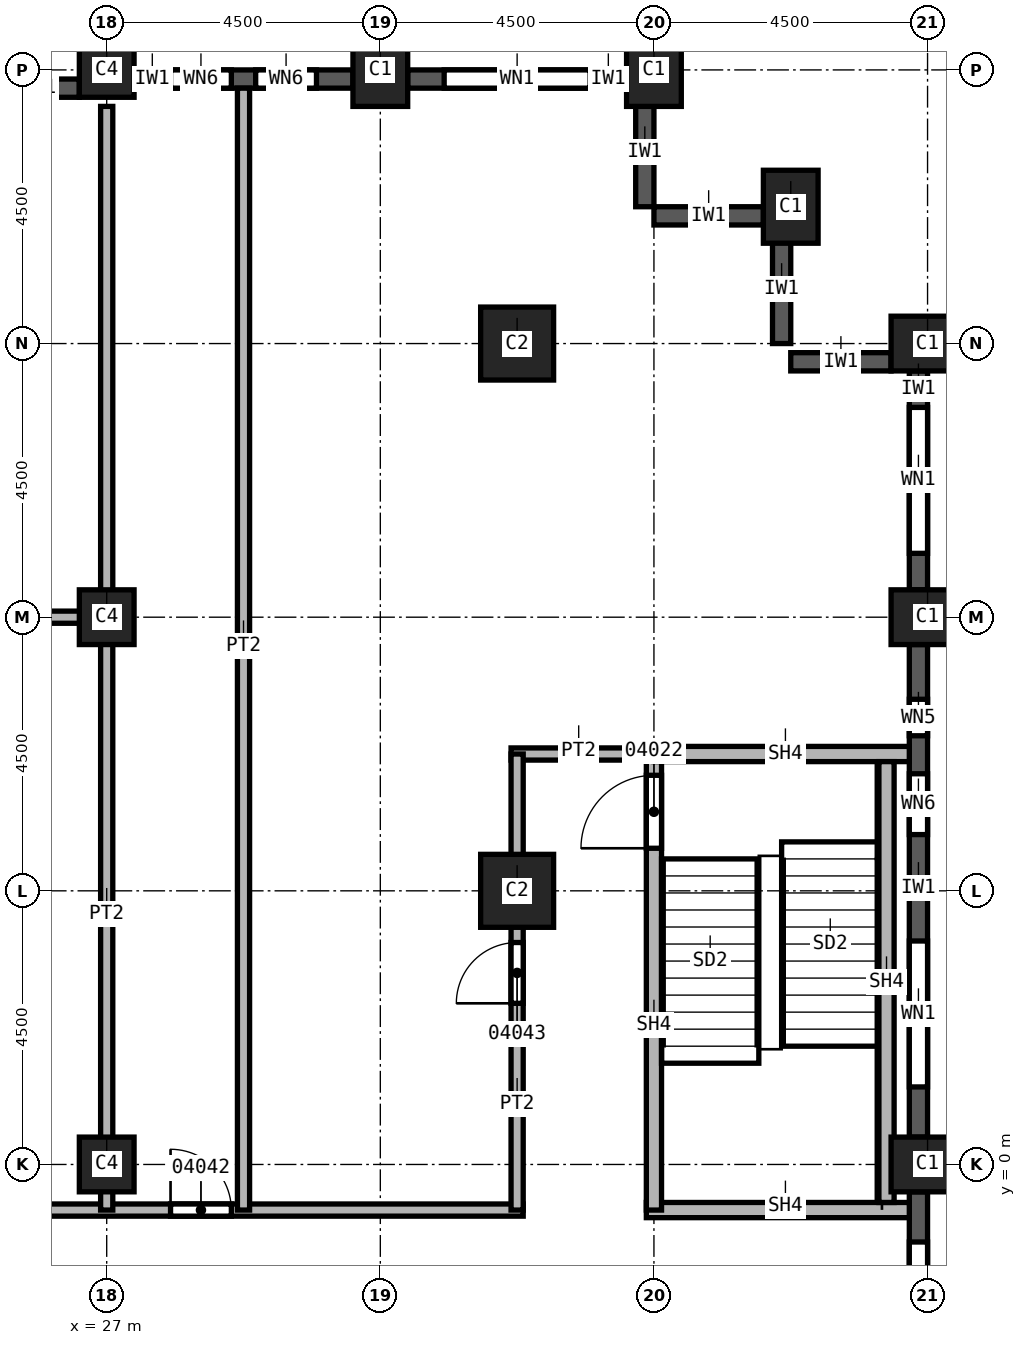
"""IFC4 building model, lengths in metres.
Left out: names, types, materials, properties, quantities, classifications, styles, units other than length and angle.
Written with IfcOpenShell. Run it as: python <this file> out.ifc"""

import sys

from ifc_helpers import new_model, si_unit, direction, frame, frame_2d, origin, origin_2d, place, context, subcontext, project, spatial, rectangle, extrude, element, fill, save


model = new_model("IFC4")
c1 = context("Model", 3, precision=1e-05, world=origin(), true_north=direction((0.0, 1.0)))
c2 = subcontext(c1, "Body", "Model", "MODEL_VIEW")
j1 = project(units=[si_unit("LENGTHUNIT", "METRE"), si_unit("PLANEANGLEUNIT", "RADIAN")], contexts=[c1])
p1 = place(None, origin())
s1 = spatial("IfcSite", under=j1, at=p1, CompositionType="ELEMENT")
p2 = place(p1, origin())
s2 = spatial("IfcBuilding", under=s1, at=p2, CompositionType="ELEMENT")
p3 = place(p2, frame((0.0, 0.0, 108.0)))
s3 = spatial("IfcBuildingStorey", under=s2, at=p3, CompositionType="ELEMENT", Elevation=108.0)
for number, where, z_axis, x_axis in (
    (1, (40.5, 0.0, 0.0), (0.0, 0.0, 1.0), (0.0, 1.0, 0.0)),
    (2, (40.5, 9.0, 0.0), (0.0, 0.0, 1.0), (0.0, 1.0, 0.0)),
    (3, (40.5, 13.5, 0.0), (0.0, 0.0, 1.0), (0.0, 1.0, 0.0)),
    (4, (38.25, 15.75, 0.0), (0.0, 0.0, 1.0), (1.0, 0.0, 0.0)),
    (5, (31.5, 18.0, 0.0), (0.0, 0.0, 1.0), (1.0, 0.0, 0.0)),
    (6, (36.0, 18.0, 0.0), (0.0, 0.0, 1.0), (1.0, 0.0, 0.0)),
):
    element("IfcColumn", number, at=place(p3, frame(where, z_axis=z_axis, x_axis=x_axis)), inside=s3, PredefinedType="COLUMN", context=c2, shape_type="SweptSolid", body=[
        extrude(rectangle(XDim=0.9, YDim=1.2, at=origin_2d()), origin(), (0.0, 0.0, 1.0), 3.7),
    ])
for number, where, z_axis, x_axis in (
    (7, (33.75, 4.5, 0.0), (0.0, 0.0, 1.0), (1.0, 0.0, 0.0)),
    (8, (33.75, 13.5, 0.0), (0.0, 0.0, 1.0), (1.0, 0.0, 0.0)),
):
    element("IfcColumn", number, at=place(p3, frame(where, z_axis=z_axis, x_axis=x_axis)), inside=s3, PredefinedType="COLUMN", context=c2, shape_type="SweptSolid", body=[
        extrude(rectangle(XDim=1.2, YDim=1.2, at=origin_2d()), origin(), (0.0, 0.0, 1.0), 3.7),
    ])
for number, where, z_axis, x_axis in (
    (9, (27.0, 0.0, 0.0), (0.0, 0.0, 1.0), (1.0, 0.0, 0.0)),
    (10, (27.0, 9.0, 0.0), (0.0, 0.0, 1.0), (1.0, 0.0, 0.0)),
    (11, (27.0, 18.0, 0.0), (0.0, 0.0, 1.0), (1.0, 0.0, 0.0)),
):
    element("IfcColumn", number, at=place(p3, frame(where, z_axis=z_axis, x_axis=x_axis)), inside=s3, PredefinedType="COLUMN", context=c2, shape_type="SweptSolid", body=[
        extrude(rectangle(XDim=0.9, YDim=0.9, at=origin_2d()), origin(), (0.0, 0.0, 1.0), 3.7),
    ])
p4 = place(p3, frame((39.9, 13.2, 0.0), z_axis=(0.0, 0.0, 1.0), x_axis=(-1.0, 0.0, 0.0)))
e12 = element("IfcWall", 12, at=p4, inside=s3, PredefinedType="SOLIDWALL", context=c2, shape_type="SweptSolid", body=[
    extrude(rectangle(XDim=1.65, YDim=0.3, at=frame_2d((0.825, 0.0))), origin(), (0.0, 0.0, 1.0), 3.1),
])
for number, where, z_axis, x_axis in (
    (13, (38.1, 15.3, 0.0), (0.0, 0.0, 1.0), (0.0, -1.0, 0.0)),
    (14, (37.8, 15.6, 0.0), (0.0, 0.0, 1.0), (-1.0, 0.0, 0.0)),
    (15, (35.85, 17.55, 0.0), (0.0, 0.0, 1.0), (0.0, -1.0, 0.0)),
):
    element("IfcWall", number, at=place(p3, frame(where, z_axis=z_axis, x_axis=x_axis)), inside=s3, PredefinedType="SOLIDWALL", context=c2, shape_type="SweptSolid", body=[
        extrude(rectangle(XDim=1.8, YDim=0.3, at=frame_2d((0.9, 0.0))), origin(), (0.0, 0.0, 1.0), 3.1),
    ])
p5 = place(p3, frame((40.35, -8.55, 0.0), z_axis=(0.0, 0.0, 1.0), x_axis=(0.0, 1.0, 0.0)))
e16 = element("IfcWall", 16, at=p5, inside=s3, PredefinedType="SOLIDWALL", context=c2, shape_type="SweptSolid", body=[
    extrude(rectangle(XDim=8.1, YDim=0.3, at=frame_2d((4.05, 0.0))), origin(), (0.0, 0.0, 1.0), 3.1),
])
p6 = place(p5, frame((0.825, 0.0, 0.8)))
e17 = element("IfcOpeningElement", 17, at=p6, cuts=e16, PredefinedType="OPENING", context=c2, shape_type="SweptSolid", body=[
    extrude(rectangle(XDim=2.4, YDim=1.95, at=frame_2d((1.2, 0.975))), frame((0.0, 0.15, 0.0), z_axis=(0.0, -1.0, 0.0), x_axis=(1.0, 0.0, 0.0)), (0.0, 0.0, 1.0), 0.3),
])
p7 = place(p5, frame((4.875, 0.0, 0.8)))
e18 = element("IfcOpeningElement", 18, at=p7, cuts=e16, PredefinedType="OPENING", context=c2, shape_type="SweptSolid", body=[
    extrude(rectangle(XDim=2.4, YDim=1.95, at=frame_2d((1.2, 0.975))), frame((0.0, 0.15, 0.0), z_axis=(0.0, -1.0, 0.0), x_axis=(1.0, 0.0, 0.0)), (0.0, 0.0, 1.0), 0.3),
])
p8 = place(p3, frame((40.35, 0.45, 0.0), z_axis=(0.0, 0.0, 1.0), x_axis=(0.0, 1.0, 0.0)))
e19 = element("IfcWall", 19, at=p8, inside=s3, PredefinedType="SOLIDWALL", context=c2, shape_type="SweptSolid", body=[
    extrude(rectangle(XDim=8.1, YDim=0.3, at=frame_2d((4.05, 0.0))), origin(), (0.0, 0.0, 1.0), 3.1),
])
p9 = place(p8, frame((0.825, 0.0, 0.8)))
e20 = element("IfcOpeningElement", 20, at=p9, cuts=e19, PredefinedType="OPENING", context=c2, shape_type="SweptSolid", body=[
    extrude(rectangle(XDim=2.4, YDim=1.95, at=frame_2d((1.2, 0.975))), frame((0.0, 0.15, 0.0), z_axis=(0.0, -1.0, 0.0), x_axis=(1.0, 0.0, 0.0)), (0.0, 0.0, 1.0), 0.3),
])
p10 = place(p8, frame((4.975, 0.0, 0.8)))
e21 = element("IfcOpeningElement", 21, at=p10, cuts=e19, PredefinedType="OPENING", context=c2, shape_type="SweptSolid", body=[
    extrude(rectangle(XDim=1.0, YDim=1.95, at=frame_2d((0.5, 0.975))), frame((0.0, 0.15, 0.0), z_axis=(0.0, -1.0, 0.0), x_axis=(1.0, 0.0, 0.0)), (0.0, 0.0, 1.0), 0.3),
])
p11 = place(p8, frame((6.6, 0.0, 0.8)))
e22 = element("IfcOpeningElement", 22, at=p11, cuts=e19, PredefinedType="OPENING", context=c2, shape_type="SweptSolid", body=[
    extrude(rectangle(XDim=0.6, YDim=1.95, at=frame_2d((0.3, 0.975))), frame((0.0, 0.15, 0.0), z_axis=(0.0, -1.0, 0.0), x_axis=(1.0, 0.0, 0.0)), (0.0, 0.0, 1.0), 0.3),
])
p12 = place(p3, frame((40.35, 9.45, 0.0), z_axis=(0.0, 0.0, 1.0), x_axis=(0.0, 1.0, 0.0)))
e23 = element("IfcWall", 23, at=p12, inside=s3, PredefinedType="SOLIDWALL", context=c2, shape_type="SweptSolid", body=[
    extrude(rectangle(XDim=3.6, YDim=0.3, at=frame_2d((1.8, 0.0))), origin(), (0.0, 0.0, 1.0), 3.1),
])
p13 = place(p12, frame((0.6, 0.0, 0.8)))
e24 = element("IfcOpeningElement", 24, at=p13, cuts=e23, PredefinedType="OPENING", context=c2, shape_type="SweptSolid", body=[
    extrude(rectangle(XDim=2.4, YDim=1.95, at=frame_2d((1.2, 0.975))), frame((0.0, 0.15, 0.0), z_axis=(0.0, -1.0, 0.0), x_axis=(1.0, 0.0, 0.0)), (0.0, 0.0, 1.0), 0.3),
])
p14 = place(p3, frame((35.55, 17.85, 0.0), z_axis=(0.0, 0.0, 1.0), x_axis=(-1.0, 0.0, 0.0)))
e25 = element("IfcWall", 25, at=p14, inside=s3, PredefinedType="SOLIDWALL", context=c2, shape_type="SweptSolid", body=[
    extrude(rectangle(XDim=3.6, YDim=0.3, at=frame_2d((1.8, 0.0))), origin(), (0.0, 0.0, 1.0), 3.1),
])
p15 = place(p14, frame((0.6, 0.0, 0.8)))
e26 = element("IfcOpeningElement", 26, at=p15, cuts=e25, PredefinedType="OPENING", context=c2, shape_type="SweptSolid", body=[
    extrude(rectangle(XDim=2.4, YDim=1.95, at=frame_2d((1.2, 0.975))), frame((0.0, 0.15, 0.0), z_axis=(0.0, -1.0, 0.0), x_axis=(1.0, 0.0, 0.0)), (0.0, 0.0, 1.0), 0.3),
])
p16 = place(p3, frame((31.05, 17.85, 0.0), z_axis=(0.0, 0.0, 1.0), x_axis=(-1.0, 0.0, 0.0)))
e27 = element("IfcWall", 27, at=p16, inside=s3, PredefinedType="SOLIDWALL", context=c2, shape_type="SweptSolid", body=[
    extrude(rectangle(XDim=3.6, YDim=0.3, at=frame_2d((1.8, 0.0))), origin(), (0.0, 0.0, 1.0), 3.1),
])
p17 = place(p16, frame((0.6, 0.0, 0.8)))
e28 = element("IfcOpeningElement", 28, at=p17, cuts=e27, PredefinedType="OPENING", context=c2, shape_type="SweptSolid", body=[
    extrude(rectangle(XDim=1.0, YDim=1.95, at=frame_2d((0.5, 0.975))), frame((0.0, 0.15, 0.0), z_axis=(0.0, -1.0, 0.0), x_axis=(1.0, 0.0, 0.0)), (0.0, 0.0, 1.0), 0.3),
])
p18 = place(p16, frame((2.0, 0.0, 0.8)))
e29 = element("IfcOpeningElement", 29, at=p18, cuts=e27, PredefinedType="OPENING", context=c2, shape_type="SweptSolid", body=[
    extrude(rectangle(XDim=1.0, YDim=1.95, at=frame_2d((0.5, 0.975))), frame((0.0, 0.15, 0.0), z_axis=(0.0, -1.0, 0.0), x_axis=(1.0, 0.0, 0.0)), (0.0, 0.0, 1.0), 0.3),
])
p19 = place(p3, frame((26.55, 17.7, 0.0), z_axis=(0.0, 0.0, 1.0), x_axis=(-1.0, 0.0, 0.0)))
e30 = element("IfcWall", 30, at=p19, inside=s3, PredefinedType="SOLIDWALL", context=c2, shape_type="SweptSolid", body=[
    extrude(rectangle(XDim=1.35, YDim=0.3, at=frame_2d((0.675, 0.0))), origin(), (0.0, 0.0, 1.0), 3.1),
])
p20 = place(p3, frame((15.4, -0.75, 0.0), z_axis=(0.0, 0.0, 1.0), x_axis=(1.0, 0.0, 0.0)))
e31 = element("IfcWall", 31, at=p20, inside=s3, PredefinedType="PARTITIONING", context=c2, shape_type="SweptSolid", body=[
    extrude(rectangle(XDim=18.45, YDim=0.2, at=frame_2d((9.225, 0.0))), origin(), (0.0, 0.0, 1.0), 3.7),
])
p21 = place(p20, frame((3.55, 0.0, 0.0)))
e32 = element("IfcOpeningElement", 32, at=p21, cuts=e31, PredefinedType="OPENING", context=c2, shape_type="SweptSolid", body=[
    extrude(rectangle(XDim=1.0, YDim=2.1, at=frame_2d((0.5, 1.05))), frame((0.0, 0.1, 0.0), z_axis=(0.0, -1.0, 0.0), x_axis=(1.0, 0.0, 0.0)), (0.0, 0.0, 1.0), 0.2),
])
p22 = place(p20, frame((12.65, 0.0, 0.0)))
e33 = element("IfcOpeningElement", 33, at=p22, cuts=e31, PredefinedType="OPENING", context=c2, shape_type="SweptSolid", body=[
    extrude(rectangle(XDim=1.0, YDim=2.1, at=frame_2d((0.5, 1.05))), frame((0.0, 0.1, 0.0), z_axis=(0.0, -1.0, 0.0), x_axis=(1.0, 0.0, 0.0)), (0.0, 0.0, 1.0), 0.2),
])
p23 = place(p3, frame((15.4, 9.0, 0.0), z_axis=(0.0, 0.0, 1.0), x_axis=(1.0, 0.0, 0.0)))
e34 = element("IfcWall", 34, at=p23, inside=s3, PredefinedType="PARTITIONING", context=c2, shape_type="SweptSolid", body=[
    extrude(rectangle(XDim=11.7, YDim=0.2, at=frame_2d((5.85, 0.0))), origin(), (0.0, 0.0, 1.0), 3.7),
])
p24 = place(p3, frame((27.0, 17.4, 0.0), z_axis=(0.0, 0.0, 1.0), x_axis=(0.0, -1.0, 0.0)))
e35 = element("IfcWall", 35, at=p24, inside=s3, PredefinedType="PARTITIONING", context=c2, shape_type="SweptSolid", body=[
    extrude(rectangle(XDim=18.15, YDim=0.2, at=frame_2d((9.075, 0.0))), origin(), (0.0, 0.0, 1.0), 3.7),
])
p25 = place(p3, frame((29.25, 17.7, 0.0), z_axis=(0.0, 0.0, 1.0), x_axis=(0.0, -1.0, 0.0)))
e36 = element("IfcWall", 36, at=p25, inside=s3, PredefinedType="PARTITIONING", context=c2, shape_type="SweptSolid", body=[
    extrude(rectangle(XDim=18.45, YDim=0.2, at=frame_2d((9.225, 0.0))), origin(), (0.0, 0.0, 1.0), 3.7),
])
p26 = place(p3, frame((33.65, 6.75, 0.0), z_axis=(0.0, 0.0, 1.0), x_axis=(1.0, 0.0, 0.0)))
e37 = element("IfcWall", 37, at=p26, inside=s3, PredefinedType="PARTITIONING", context=c2, shape_type="SweptSolid", body=[
    extrude(rectangle(XDim=2.35, YDim=0.2, at=frame_2d((1.175, 0.0))), origin(), (0.0, 0.0, 1.0), 3.7),
])
p27 = place(p3, frame((33.75, -0.75, 0.0), z_axis=(0.0, 0.0, 1.0), x_axis=(0.0, 1.0, 0.0)))
e38 = element("IfcWall", 38, at=p27, inside=s3, PredefinedType="PARTITIONING", context=c2, shape_type="SweptSolid", body=[
    extrude(rectangle(XDim=7.5, YDim=0.2, at=frame_2d((3.75, 0.0))), origin(), (0.0, 0.0, 1.0), 3.7),
])
p28 = place(p27, frame((3.4, 0.0, 0.0)))
e39 = element("IfcOpeningElement", 39, at=p28, cuts=e38, PredefinedType="OPENING", context=c2, shape_type="SweptSolid", body=[
    extrude(rectangle(XDim=1.0, YDim=2.1, at=frame_2d((0.5, 1.05))), frame((0.0, 0.1, 0.0), z_axis=(0.0, -1.0, 0.0), x_axis=(1.0, 0.0, 0.0)), (0.0, 0.0, 1.0), 0.2),
])
p29 = place(p3, frame((35.875, -0.75, 0.0), z_axis=(0.0, 0.0, 1.0), x_axis=(1.0, 0.0, 0.0)))
e40 = element("IfcWall", 40, at=p29, inside=s3, PredefinedType="SOLIDWALL", context=c2, shape_type="SweptSolid", body=[
    extrude(rectangle(XDim=4.325, YDim=0.25, at=frame_2d((2.163, 0.0))), origin(), (0.0, 0.0, 1.0), 3.7),
])
p30 = place(p3, frame((36.0, -0.75, 0.0), z_axis=(0.0, 0.0, 1.0), x_axis=(0.0, 1.0, 0.0)))
e41 = element("IfcWall", 41, at=p30, inside=s3, PredefinedType="SOLIDWALL", context=c2, shape_type="SweptSolid", body=[
    extrude(rectangle(XDim=7.625, YDim=0.25, at=frame_2d((3.812, 0.0))), origin(), (0.0, 0.0, 1.0), 3.7),
])
p31 = place(p30, frame((5.95, 0.0, 0.0)))
e42 = element("IfcOpeningElement", 42, at=p31, cuts=e41, PredefinedType="OPENING", context=c2, shape_type="SweptSolid", body=[
    extrude(rectangle(XDim=1.2, YDim=2.1, at=frame_2d((0.6, 1.05))), frame((0.0, 0.125, 0.0), z_axis=(0.0, -1.0, 0.0), x_axis=(1.0, 0.0, 0.0)), (0.0, 0.0, 1.0), 0.25),
])
p32 = place(p3, frame((36.0, 6.75, 0.0), z_axis=(0.0, 0.0, 1.0), x_axis=(1.0, 0.0, 0.0)))
e43 = element("IfcWall", 43, at=p32, inside=s3, PredefinedType="SOLIDWALL", context=c2, shape_type="SweptSolid", body=[
    extrude(rectangle(XDim=4.2, YDim=0.25, at=frame_2d((2.1, 0.0))), origin(), (0.0, 0.0, 1.0), 3.7),
])
p33 = place(p3, frame((39.825, -0.625, 0.0), z_axis=(0.0, 0.0, 1.0), x_axis=(0.0, 1.0, 0.0)))
e44 = element("IfcWall", 44, at=p33, inside=s3, PredefinedType="SOLIDWALL", context=c2, shape_type="SweptSolid", body=[
    extrude(rectangle(XDim=7.25, YDim=0.25, at=frame_2d((3.625, 0.0))), origin(), (0.0, 0.0, 1.0), 3.7),
])
p34 = place(p7, origin())
e45 = element("IfcWindow", 45, at=p34, inside=s3, PartitioningType="SINGLE_PANEL", PredefinedType="WINDOW", context=c2, shape_type="SweptSolid", body=[
    extrude(rectangle(XDim=2.4, YDim=1.95, at=frame_2d((1.2, 0.975))), frame((0.0, 0.03, 0.0), z_axis=(0.0, -1.0, 0.0), x_axis=(1.0, 0.0, 0.0)), (0.0, 0.0, 1.0), 0.06),
])
fill(e18, e45)
p35 = place(p9, origin())
e46 = element("IfcWindow", 46, at=p35, inside=s3, PartitioningType="SINGLE_PANEL", PredefinedType="WINDOW", context=c2, shape_type="SweptSolid", body=[
    extrude(rectangle(XDim=2.4, YDim=1.95, at=frame_2d((1.2, 0.975))), frame((0.0, 0.03, 0.0), z_axis=(0.0, -1.0, 0.0), x_axis=(1.0, 0.0, 0.0)), (0.0, 0.0, 1.0), 0.06),
])
fill(e20, e46)
p36 = place(p13, origin())
e47 = element("IfcWindow", 47, at=p36, inside=s3, PartitioningType="SINGLE_PANEL", PredefinedType="WINDOW", context=c2, shape_type="SweptSolid", body=[
    extrude(rectangle(XDim=2.4, YDim=1.95, at=frame_2d((1.2, 0.975))), frame((0.0, 0.03, 0.0), z_axis=(0.0, -1.0, 0.0), x_axis=(1.0, 0.0, 0.0)), (0.0, 0.0, 1.0), 0.06),
])
fill(e24, e47)
p37 = place(p15, origin())
e48 = element("IfcWindow", 48, at=p37, inside=s3, PartitioningType="SINGLE_PANEL", PredefinedType="WINDOW", context=c2, shape_type="SweptSolid", body=[
    extrude(rectangle(XDim=2.4, YDim=1.95, at=frame_2d((1.2, 0.975))), frame((0.0, 0.03, 0.0), z_axis=(0.0, -1.0, 0.0), x_axis=(1.0, 0.0, 0.0)), (0.0, 0.0, 1.0), 0.06),
])
fill(e26, e48)
p38 = place(p31, origin())
e49 = element("IfcDoor", 49, at=p38, inside=s3, OperationType="SINGLE_SWING_LEFT", PredefinedType="DOOR", context=c2, shape_type="SweptSolid", body=[
    extrude(rectangle(XDim=1.2, YDim=2.1, at=frame_2d((0.6, 1.05))), frame((0.0, 0.025, 0.0), z_axis=(0.0, -1.0, 0.0), x_axis=(1.0, 0.0, 0.0)), (0.0, 0.0, 1.0), 0.05),
])
fill(e42, e49)
p39 = place(p22, origin())
e50 = element("IfcDoor", 50, at=p39, inside=s3, OperationType="SINGLE_SWING_LEFT", PredefinedType="DOOR", context=c2, shape_type="SweptSolid", body=[
    extrude(rectangle(XDim=1.0, YDim=2.1, at=frame_2d((0.5, 1.05))), frame((0.0, 0.025, 0.0), z_axis=(0.0, -1.0, 0.0), x_axis=(1.0, 0.0, 0.0)), (0.0, 0.0, 1.0), 0.05),
])
fill(e33, e50)
p40 = place(p28, origin())
e51 = element("IfcDoor", 51, at=p40, inside=s3, OperationType="SINGLE_SWING_RIGHT", PredefinedType="DOOR", context=c2, shape_type="SweptSolid", body=[
    extrude(rectangle(XDim=1.0, YDim=2.1, at=frame_2d((0.5, 1.05))), frame((0.0, 0.025, 0.0), z_axis=(0.0, -1.0, 0.0), x_axis=(1.0, 0.0, 0.0)), (0.0, 0.0, 1.0), 0.05),
])
fill(e39, e51)
p41 = place(p10, origin())
e52 = element("IfcWindow", 52, at=p41, inside=s3, PartitioningType="SINGLE_PANEL", PredefinedType="WINDOW", context=c2, shape_type="SweptSolid", body=[
    extrude(rectangle(XDim=1.0, YDim=1.95, at=frame_2d((0.5, 0.975))), frame((0.0, 0.03, 0.0), z_axis=(0.0, -1.0, 0.0), x_axis=(1.0, 0.0, 0.0)), (0.0, 0.0, 1.0), 0.06),
])
fill(e21, e52)
p42 = place(p11, origin())
e53 = element("IfcWindow", 53, at=p42, inside=s3, PartitioningType="SINGLE_PANEL", PredefinedType="WINDOW", context=c2, shape_type="SweptSolid", body=[
    extrude(rectangle(XDim=0.6, YDim=1.95, at=frame_2d((0.3, 0.975))), frame((0.0, 0.03, 0.0), z_axis=(0.0, -1.0, 0.0), x_axis=(1.0, 0.0, 0.0)), (0.0, 0.0, 1.0), 0.06),
])
fill(e22, e53)
p43 = place(p17, origin())
e54 = element("IfcWindow", 54, at=p43, inside=s3, PartitioningType="SINGLE_PANEL", PredefinedType="WINDOW", context=c2, shape_type="SweptSolid", body=[
    extrude(rectangle(XDim=1.0, YDim=1.95, at=frame_2d((0.5, 0.975))), frame((0.0, 0.03, 0.0), z_axis=(0.0, -1.0, 0.0), x_axis=(1.0, 0.0, 0.0)), (0.0, 0.0, 1.0), 0.06),
])
fill(e28, e54)
p44 = place(p18, origin())
e55 = element("IfcWindow", 55, at=p44, inside=s3, PartitioningType="SINGLE_PANEL", PredefinedType="WINDOW", context=c2, shape_type="SweptSolid", body=[
    extrude(rectangle(XDim=1.0, YDim=1.95, at=frame_2d((0.5, 0.975))), frame((0.0, 0.03, 0.0), z_axis=(0.0, -1.0, 0.0), x_axis=(1.0, 0.0, 0.0)), (0.0, 0.0, 1.0), 0.06),
])
fill(e29, e55)
save(model, sys.argv[1])
